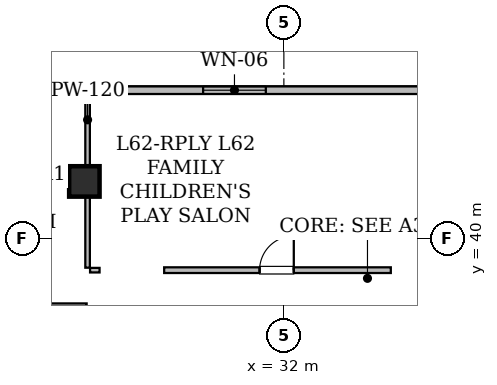
"""IFC4 building model, lengths in metres.
Left out: names, types, materials, properties, quantities, classifications, styles, units other than length and angle.
Written with IfcOpenShell. Run it as: python <this file> out.ifc"""

import sys

from ifc_helpers import new_model, si_unit, direction, frame, frame_2d, origin, origin_2d, place, context, subcontext, project, spatial, rectangle, hollow_rectangle, extrude, element, fill, save


model = new_model("IFC4")
c1 = context("Model", 3, precision=1e-05, world=origin(), true_north=direction((0.0, 1.0)))
c2 = subcontext(c1, "Body", "Model", "MODEL_VIEW")
j1 = project(units=[si_unit("LENGTHUNIT", "METRE"), si_unit("PLANEANGLEUNIT", "RADIAN")], contexts=[c1])
p1 = place(None, origin())
s1 = spatial("IfcSite", under=j1, at=p1, CompositionType="ELEMENT")
p2 = place(p1, origin())
s2 = spatial("IfcBuilding", under=s1, at=p2, CompositionType="ELEMENT")
p3 = place(p2, frame((0.0, 0.0, 242.75)))
s3 = spatial("IfcBuildingStorey", under=s2, at=p3, CompositionType="ELEMENT", Elevation=242.75)
p4 = place(p3, frame((26.75, 41.5, 0.0), z_axis=(0.0, 0.0, 1.0), x_axis=(1.0, 0.0, 0.0)))
e1 = element("IfcColumn", 1, at=p4, inside=s3, PredefinedType="COLUMN", context=c2, shape_type="SweptSolid", body=[
    extrude(hollow_rectangle(XDim=0.8, YDim=0.8, WallThickness=0.04, at=origin_2d()), origin(), (0.0, 0.0, 1.0), 3.65),
])
p5 = place(p3, frame((24.302, 43.9, 0.0), z_axis=(0.0, 0.0, 1.0), x_axis=(1.0, 0.0, 0.0)))
e2 = element("IfcWall", 2, at=p5, inside=s3, PredefinedType="STANDARD", context=c2, shape_type="SweptSolid", body=[
    extrude(rectangle(XDim=41.457, YDim=0.2, at=frame_2d((20.729, 0.0))), origin(), (0.0, 0.0, 1.0), 3.43),
])
p6 = place(p5, frame((5.573, 0.0, 0.85)))
e3 = element("IfcOpeningElement", 3, at=p6, cuts=e2, PredefinedType="OPENING", context=c2, shape_type="SweptSolid", body=[
    extrude(rectangle(XDim=1.65, YDim=1.55, at=frame_2d((0.825, 0.775))), frame((0.0, 0.11, 0.0), z_axis=(0.0, -1.0, 0.0), x_axis=(1.0, 0.0, 0.0)), (0.0, 0.0, 1.0), 0.22),
])
p7 = place(p5, frame((0.604, 0.0, 0.85)))
e4 = element("IfcOpeningElement", 4, at=p7, cuts=e2, PredefinedType="OPENING", context=c2, shape_type="SweptSolid", body=[
    extrude(rectangle(XDim=1.65, YDim=1.55, at=frame_2d((0.825, 0.775))), frame((0.0, 0.11, 0.0), z_axis=(0.0, -1.0, 0.0), x_axis=(1.0, 0.0, 0.0)), (0.0, 0.0, 1.0), 0.22),
])
p8 = place(p5, frame((23.188, 0.0, 0.8)))
e5 = element("IfcOpeningElement", 5, at=p8, cuts=e2, PredefinedType="OPENING", context=c2, shape_type="SweptSolid", body=[
    extrude(rectangle(XDim=1.2, YDim=1.5, at=frame_2d((0.6, 0.75))), frame((0.0, 0.11, 0.0), z_axis=(0.0, -1.0, 0.0), x_axis=(1.0, 0.0, 0.0)), (0.0, 0.0, 1.0), 0.22),
])
p9 = place(p5, frame((19.333, 0.0, 0.85)))
e6 = element("IfcOpeningElement", 6, at=p9, cuts=e2, PredefinedType="OPENING", context=c2, shape_type="SweptSolid", body=[
    extrude(rectangle(XDim=1.65, YDim=1.55, at=frame_2d((0.825, 0.775))), frame((0.0, 0.11, 0.0), z_axis=(0.0, -1.0, 0.0), x_axis=(1.0, 0.0, 0.0)), (0.0, 0.0, 1.0), 0.22),
])
p10 = place(p5, frame((26.593, 0.0, 0.85)))
e7 = element("IfcOpeningElement", 7, at=p10, cuts=e2, PredefinedType="OPENING", context=c2, shape_type="SweptSolid", body=[
    extrude(rectangle(XDim=1.65, YDim=1.55, at=frame_2d((0.825, 0.775))), frame((0.0, 0.11, 0.0), z_axis=(0.0, -1.0, 0.0), x_axis=(1.0, 0.0, 0.0)), (0.0, 0.0, 1.0), 0.22),
])
p11 = place(p5, frame((32.843, 0.0, 0.85)))
e8 = element("IfcOpeningElement", 8, at=p11, cuts=e2, PredefinedType="OPENING", context=c2, shape_type="SweptSolid", body=[
    extrude(rectangle(XDim=1.65, YDim=1.55, at=frame_2d((0.825, 0.775))), frame((0.0, 0.11, 0.0), z_axis=(0.0, -1.0, 0.0), x_axis=(1.0, 0.0, 0.0)), (0.0, 0.0, 1.0), 0.22),
])
p12 = place(p3, frame((28.85, 39.165, 0.0), z_axis=(0.0, 0.0, 1.0), x_axis=(1.0, 0.0, 0.0)))
e9 = element("IfcWall", 9, at=p12, inside=s3, PredefinedType="STANDARD", context=c2, shape_type="SweptSolid", body=[
    extrude(rectangle(XDim=5.964, YDim=0.15, at=frame_2d((2.982, 0.0))), origin(), (0.0, 0.0, 1.0), 3.43),
])
p13 = place(p12, frame((2.511, 0.0, 0.0)))
e10 = element("IfcOpeningElement", 10, at=p13, cuts=e9, PredefinedType="OPENING", context=c2, shape_type="SweptSolid", body=[
    extrude(rectangle(XDim=0.9, YDim=2.1, at=frame_2d((0.45, 1.05))), frame((0.0, 0.085, 0.0), z_axis=(0.0, -1.0, 0.0), x_axis=(1.0, 0.0, 0.0)), (0.0, 0.0, 1.0), 0.17),
])
p14 = place(p3, frame((27.15, 39.165, 0.0), z_axis=(0.0, 0.0, 1.0), x_axis=(-1.0, 0.0, 0.0)))
e11 = element("IfcWall", 11, at=p14, inside=s3, PredefinedType="PARTITIONING", context=c2, shape_type="SweptSolid", body=[
    extrude(rectangle(XDim=0.25, YDim=0.12, at=frame_2d((0.125, 0.0))), origin(), (0.0, 0.0, 1.0), 3.43),
])
p15 = place(p3, frame((26.835, 39.23, 0.0), z_axis=(0.0, 0.0, 1.0), x_axis=(0.0, 1.0, 0.0)))
e12 = element("IfcWall", 12, at=p15, inside=s3, PredefinedType="PARTITIONING", context=c2, shape_type="SweptSolid", body=[
    extrude(rectangle(XDim=4.578, YDim=0.12, at=frame_2d((2.289, 0.0))), origin(), (0.0, 0.0, 1.0), 2.725),
])
p16 = place(p3, frame((20.392, 38.23, 0.0), z_axis=(0.0, 0.0, 1.0), x_axis=(1.0, 0.0, 0.0)))
e13 = element("IfcWall", 13, at=p16, inside=s3, PredefinedType="PARTITIONING", context=c2, shape_type="SweptSolid", body=[
    extrude(rectangle(XDim=6.418, YDim=0.12, at=frame_2d((3.209, 0.0))), origin(), (0.0, 0.0, 1.0), 2.887),
])
p17 = place(p16, frame((2.759, 0.0, 0.0)))
e14 = element("IfcOpeningElement", 14, at=p17, cuts=e13, PredefinedType="OPENING", context=c2, shape_type="SweptSolid", body=[
    extrude(rectangle(XDim=0.9, YDim=2.1, at=frame_2d((0.45, 1.05))), frame((0.0, 0.07, 0.0), z_axis=(0.0, -1.0, 0.0), x_axis=(1.0, 0.0, 0.0)), (0.0, 0.0, 1.0), 0.14),
])
p18 = place(p6, origin())
e15 = element("IfcWindow", 15, at=p18, inside=s3, PartitioningType="SINGLE_PANEL", PredefinedType="WINDOW", context=c2, shape_type="SweptSolid", body=[
    extrude(rectangle(XDim=1.65, YDim=1.55, at=frame_2d((0.825, 0.775))), frame((0.0, 0.03, 0.0), z_axis=(0.0, -1.0, 0.0), x_axis=(1.0, 0.0, 0.0)), (0.0, 0.0, 1.0), 0.06),
])
fill(e3, e15)
p19 = place(p7, origin())
e16 = element("IfcWindow", 16, at=p19, inside=s3, PartitioningType="SINGLE_PANEL", PredefinedType="WINDOW", context=c2, shape_type="SweptSolid", body=[
    extrude(rectangle(XDim=1.65, YDim=1.55, at=frame_2d((0.825, 0.775))), frame((0.0, 0.03, 0.0), z_axis=(0.0, -1.0, 0.0), x_axis=(1.0, 0.0, 0.0)), (0.0, 0.0, 1.0), 0.06),
])
fill(e4, e16)
p20 = place(p13, origin())
e17 = element("IfcDoor", 17, at=p20, inside=s3, OperationType="SINGLE_SWING_RIGHT", PredefinedType="DOOR", context=c2, shape_type="SweptSolid", body=[
    extrude(rectangle(XDim=0.9, YDim=2.1, at=frame_2d((0.45, 1.05))), frame((0.0, 0.025, 0.0), z_axis=(0.0, -1.0, 0.0), x_axis=(1.0, 0.0, 0.0)), (0.0, 0.0, 1.0), 0.05),
])
fill(e10, e17)
save(model, sys.argv[1])
